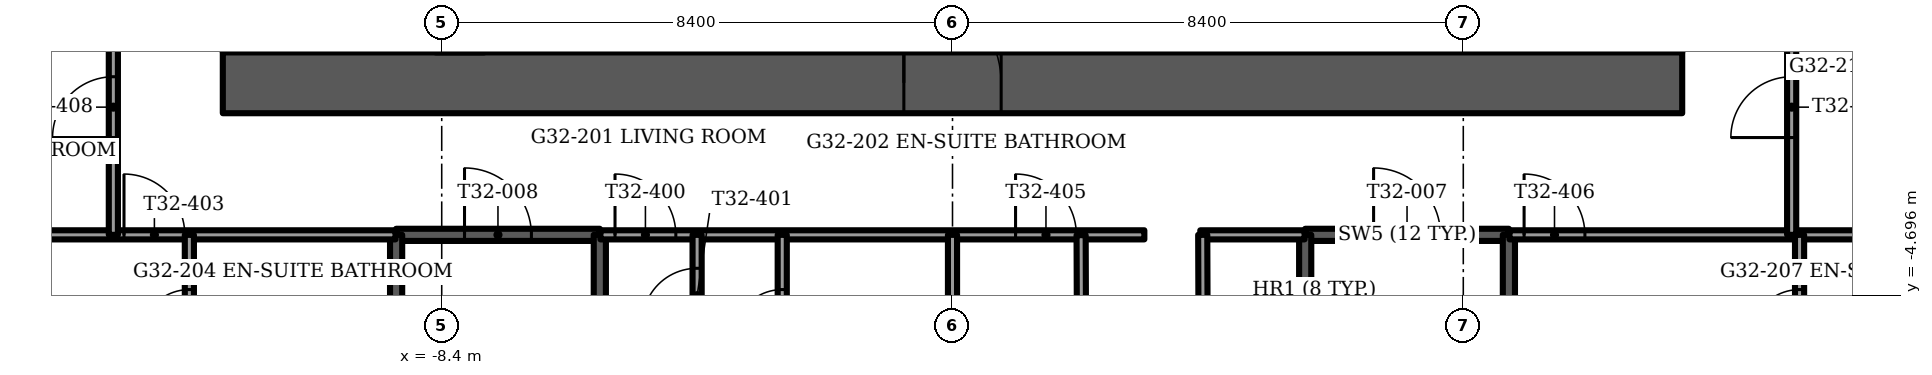
"""IFC4 building model, lengths in metres.
Left out: names, types, materials, properties, quantities, classifications, styles, units other than length and angle.
Written with IfcOpenShell. Run it as: python <this file> out.ifc"""

import sys

from ifc_helpers import new_model, si_unit, direction, frame, frame_2d, origin, place, context, subcontext, project, spatial, rectangle, extrude, element, fill, save


model = new_model("IFC4")
c1 = context("Model", 3, precision=1e-05, world=origin(), true_north=direction((0.0, 1.0)))
c2 = subcontext(c1, "Body", "Model", "MODEL_VIEW")
j1 = project(units=[si_unit("LENGTHUNIT", "METRE"), si_unit("PLANEANGLEUNIT", "RADIAN")], contexts=[c1])
p1 = place(None, origin())
s1 = spatial("IfcSite", under=j1, at=p1, CompositionType="ELEMENT")
p2 = place(p1, origin())
s2 = spatial("IfcBuilding", under=s1, at=p2, CompositionType="ELEMENT")
p3 = place(p2, frame((0.0, 0.0, 131.0)))
s3 = spatial("IfcBuildingStorey", under=s2, at=p3, CompositionType="ELEMENT", Elevation=131.0)
p4 = place(p3, frame((-12.0, -1.2, -0.3), z_axis=(0.0, 0.0, 1.0), x_axis=(1.0, 0.0, 0.0)))
e1 = element("IfcWall", 1, at=p4, inside=s3, PredefinedType="SHEAR", context=c2, shape_type="SweptSolid", body=[
    extrude(rectangle(XDim=24.0, YDim=1.0, at=frame_2d((12.0, 0.0))), origin(), (0.0, 0.0, 1.0), 3.75),
])
p5 = place(p4, frame((11.2, 0.0, 0.0)))
e2 = element("IfcOpeningElement", 2, at=p5, cuts=e1, PredefinedType="OPENING", context=c2, shape_type="SweptSolid", body=[
    extrude(rectangle(XDim=1.6, YDim=2.1, at=frame_2d((0.8, 1.05))), frame((0.0, 0.5, 0.0), z_axis=(0.0, -1.0, 0.0), x_axis=(1.0, 0.0, 0.0)), (0.0, 0.0, 1.0), 1.0),
])
p6 = place(p3, frame((-18.663, -1.525, 0.0), z_axis=(0.0, 0.0, 1.0), x_axis=(0.499997430087, -0.866026887519, 0.0)))
e3 = element("IfcWall", 3, at=p6, inside=s3, PredefinedType="SOLIDWALL", context=c2, shape_type="SweptSolid", body=[
    extrude(rectangle(XDim=10.657, YDim=0.15, at=frame_2d((5.329, 0.0))), origin(), (0.0, 0.0, 1.0), 3.45),
])
p7 = place(p6, frame((2.835, 0.0, 0.15)))
e4 = element("IfcOpeningElement", 4, at=p7, cuts=e3, PredefinedType="OPENING", context=c2, shape_type="SweptSolid", body=[
    extrude(rectangle(XDim=1.7, YDim=2.2, at=frame_2d((0.85, 1.1))), frame((0.0, 0.075, 0.0), z_axis=(0.0, -1.0, 0.0), x_axis=(1.0, 0.0, 0.0)), (0.0, 0.0, 1.0), 0.15),
])
p8 = place(p6, frame((8.573, 0.0, 0.15)))
e5 = element("IfcOpeningElement", 5, at=p8, cuts=e3, PredefinedType="OPENING", context=c2, shape_type="SweptSolid", body=[
    extrude(rectangle(XDim=0.9, YDim=2.2, at=frame_2d((0.45, 1.1))), frame((0.0, 0.075, 0.0), z_axis=(0.0, -1.0, 0.0), x_axis=(1.0, 0.0, 0.0)), (0.0, 0.0, 1.0), 0.15),
])
p9 = place(p6, frame((7.023, 0.0, 0.0)))
e6 = element("IfcOpeningElement", 6, at=p9, cuts=e3, PredefinedType="OPENING", context=c2, shape_type="SweptSolid", body=[
    extrude(rectangle(XDim=1.5, YDim=2.4, at=frame_2d((0.75, 1.2))), frame((0.0, 0.075, 0.0), z_axis=(0.0, -1.0, 0.0), x_axis=(1.0, 0.0, 0.0)), (0.0, 0.0, 1.0), 0.15),
])
p10 = place(p3, frame((13.334, -10.755, 0.0), z_axis=(0.0, 0.0, 1.0), x_axis=(0.499997430087, 0.866026887519, 0.0)))
e7 = element("IfcWall", 7, at=p10, inside=s3, PredefinedType="SOLIDWALL", context=c2, shape_type="SweptSolid", body=[
    extrude(rectangle(XDim=10.657, YDim=0.15, at=frame_2d((5.329, 0.0))), origin(), (0.0, 0.0, 1.0), 3.45),
])
p11 = place(p10, frame((0.847, 0.0, 0.15)))
e8 = element("IfcOpeningElement", 8, at=p11, cuts=e7, PredefinedType="OPENING", context=c2, shape_type="SweptSolid", body=[
    extrude(rectangle(XDim=1.7, YDim=2.2, at=frame_2d((0.85, 1.1))), frame((0.0, 0.075, 0.0), z_axis=(0.0, -1.0, 0.0), x_axis=(1.0, 0.0, 0.0)), (0.0, 0.0, 1.0), 0.15),
])
p12 = place(p10, frame((6.322, 0.0, 0.15)))
e9 = element("IfcOpeningElement", 9, at=p12, cuts=e7, PredefinedType="OPENING", context=c2, shape_type="SweptSolid", body=[
    extrude(rectangle(XDim=1.5, YDim=2.2, at=frame_2d((0.75, 1.1))), frame((0.0, 0.075, 0.0), z_axis=(0.0, -1.0, 0.0), x_axis=(1.0, 0.0, 0.0)), (0.0, 0.0, 1.0), 0.15),
])
for number, where, z_axis, x_axis in (
    (10, (-6.4, -0.7, 0.0), (0.0, 0.0, 1.0), (0.0, 1.0, 0.0)),
    (11, (-5.1, -0.7, 0.0), (0.0, 0.0, 1.0), (0.0, 1.0, 0.0)),
    (12, (5.1, -0.7, 0.0), (0.0, 0.0, 1.0), (0.0, 1.0, 0.0)),
    (13, (6.4, -0.7, 0.0), (0.0, 0.0, 1.0), (0.0, 1.0, 0.0)),
):
    element("IfcWall", number, at=place(p3, frame(where, z_axis=z_axis, x_axis=x_axis)), inside=s3, PredefinedType="PARTITIONING", context=c2, shape_type="SweptSolid", body=[
        extrude(rectangle(XDim=1.6, YDim=0.15, at=frame_2d((0.8, 0.0))), origin(), (0.0, 0.0, 1.0), 3.45),
    ])
p13 = place(p3, frame((5.8, -3.7, -0.3), z_axis=(0.0, 0.0, 1.0), x_axis=(1.0, 0.0, 0.0)))
e14 = element("IfcWall", 14, at=p13, inside=s3, PredefinedType="SOLIDWALL", context=c2, shape_type="SweptSolid", body=[
    extrude(rectangle(XDim=3.35, YDim=0.2, at=frame_2d((1.675, 0.0))), origin(), (0.0, 0.0, 1.0), 3.75),
])
p14 = place(p13, frame((1.125, 0.0, 0.0)))
e15 = element("IfcOpeningElement", 15, at=p14, cuts=e14, PredefinedType="OPENING", context=c2, shape_type="SweptSolid", body=[
    extrude(rectangle(XDim=1.1, YDim=2.1, at=frame_2d((0.55, 1.05))), frame((0.0, 0.1, 0.0), z_axis=(0.0, -1.0, 0.0), x_axis=(1.0, 0.0, 0.0)), (0.0, 0.0, 1.0), 0.2),
])
for number, where, z_axis, x_axis in (
    (16, (5.8, -3.7, -0.3), (0.0, 0.0, 1.0), (0.0, -1.0, 0.0)),
    (17, (9.15, -3.7, -0.3), (0.0, 0.0, 1.0), (0.0, -1.0, 0.0)),
):
    element("IfcWall", number, at=place(p3, frame(where, z_axis=z_axis, x_axis=x_axis)), inside=s3, PredefinedType="SOLIDWALL", context=c2, shape_type="SweptSolid", body=[
        extrude(rectangle(XDim=7.7, YDim=0.2, at=frame_2d((3.85, 0.0))), origin(), (0.0, 0.0, 1.0), 3.75),
    ])
p15 = place(p3, frame((-9.15, -3.7, -0.3), z_axis=(0.0, 0.0, 1.0), x_axis=(1.0, 0.0, 0.0)))
e18 = element("IfcWall", 18, at=p15, inside=s3, PredefinedType="SOLIDWALL", context=c2, shape_type="SweptSolid", body=[
    extrude(rectangle(XDim=3.35, YDim=0.2, at=frame_2d((1.675, 0.0))), origin(), (0.0, 0.0, 1.0), 3.75),
])
p16 = place(p15, frame((1.125, 0.0, 0.0)))
e19 = element("IfcOpeningElement", 19, at=p16, cuts=e18, PredefinedType="OPENING", context=c2, shape_type="SweptSolid", body=[
    extrude(rectangle(XDim=1.1, YDim=2.1, at=frame_2d((0.55, 1.05))), frame((0.0, 0.1, 0.0), z_axis=(0.0, -1.0, 0.0), x_axis=(1.0, 0.0, 0.0)), (0.0, 0.0, 1.0), 0.2),
])
for number, where, z_axis, x_axis in (
    (20, (-9.15, -3.7, -0.3), (0.0, 0.0, 1.0), (0.0, -1.0, 0.0)),
    (21, (-5.8, -3.7, -0.3), (0.0, 0.0, 1.0), (0.0, -1.0, 0.0)),
):
    element("IfcWall", number, at=place(p3, frame(where, z_axis=z_axis, x_axis=x_axis)), inside=s3, PredefinedType="SOLIDWALL", context=c2, shape_type="SweptSolid", body=[
        extrude(rectangle(XDim=7.7, YDim=0.2, at=frame_2d((3.85, 0.0))), origin(), (0.0, 0.0, 1.0), 3.75),
    ])
p17 = place(p3, frame((-17.459, -3.7, 0.0), z_axis=(0.0, 0.0, 1.0), x_axis=(1.0, 0.0, 0.0)))
e22 = element("IfcWall", 22, at=p17, inside=s3, PredefinedType="PARTITIONING", context=c2, shape_type="SweptSolid", body=[
    extrude(rectangle(XDim=8.299, YDim=0.15, at=frame_2d((4.149, 0.0))), origin(), (0.0, 0.0, 1.0), 3.45),
])
p18 = place(p17, frame((3.834, 0.0, 0.0)))
e23 = element("IfcOpeningElement", 23, at=p18, cuts=e22, PredefinedType="OPENING", context=c2, shape_type="SweptSolid", body=[
    extrude(rectangle(XDim=1.0, YDim=2.1, at=frame_2d((0.5, 1.05))), frame((0.0, 0.075, 0.0), z_axis=(0.0, -1.0, 0.0), x_axis=(1.0, 0.0, 0.0)), (0.0, 0.0, 1.0), 0.15),
])
p19 = place(p3, frame((-5.79, -3.7, 0.0), z_axis=(0.0, 0.0, 1.0), x_axis=(1.0, 0.0, 0.0)))
e24 = element("IfcWall", 24, at=p19, inside=s3, PredefinedType="PARTITIONING", context=c2, shape_type="SweptSolid", body=[
    extrude(rectangle(XDim=8.945, YDim=0.15, at=frame_2d((4.473, 0.0))), origin(), (0.0, 0.0, 1.0), 3.45),
])
p20 = place(p19, frame((0.24, 0.0, 0.0)))
e25 = element("IfcOpeningElement", 25, at=p20, cuts=e24, PredefinedType="OPENING", context=c2, shape_type="SweptSolid", body=[
    extrude(rectangle(XDim=1.0, YDim=2.1, at=frame_2d((0.5, 1.05))), frame((0.0, 0.075, 0.0), z_axis=(0.0, -1.0, 0.0), x_axis=(1.0, 0.0, 0.0)), (0.0, 0.0, 1.0), 0.15),
])
p21 = place(p19, frame((6.827, 0.0, 0.0)))
e26 = element("IfcOpeningElement", 26, at=p21, cuts=e24, PredefinedType="OPENING", context=c2, shape_type="SweptSolid", body=[
    extrude(rectangle(XDim=1.0, YDim=2.1, at=frame_2d((0.5, 1.05))), frame((0.0, 0.075, 0.0), z_axis=(0.0, -1.0, 0.0), x_axis=(1.0, 0.0, 0.0)), (0.0, 0.0, 1.0), 0.15),
])
p22 = place(p3, frame((4.075, -3.7, 0.0), z_axis=(0.0, 0.0, 1.0), x_axis=(1.0, 0.0, 0.0)))
e27 = element("IfcWall", 27, at=p22, inside=s3, PredefinedType="PARTITIONING", context=c2, shape_type="SweptSolid", body=[
    extrude(rectangle(XDim=1.715, YDim=0.15, at=frame_2d((0.857, 0.0))), origin(), (0.0, 0.0, 1.0), 3.45),
])
p23 = place(p3, frame((9.16, -3.7, 0.0), z_axis=(0.0, 0.0, 1.0), x_axis=(1.0, 0.0, 0.0)))
e28 = element("IfcWall", 28, at=p23, inside=s3, PredefinedType="PARTITIONING", context=c2, shape_type="SweptSolid", body=[
    extrude(rectangle(XDim=8.299, YDim=0.15, at=frame_2d((4.149, 0.0))), origin(), (0.0, 0.0, 1.0), 3.45),
])
p24 = place(p23, frame((0.24, 0.0, 0.0)))
e29 = element("IfcOpeningElement", 29, at=p24, cuts=e28, PredefinedType="OPENING", context=c2, shape_type="SweptSolid", body=[
    extrude(rectangle(XDim=1.0, YDim=2.1, at=frame_2d((0.5, 1.05))), frame((0.0, 0.075, 0.0), z_axis=(0.0, -1.0, 0.0), x_axis=(1.0, 0.0, 0.0)), (0.0, 0.0, 1.0), 0.15),
])
p25 = place(p3, frame((13.93, -6.3, 0.0), z_axis=(0.0, 0.0, 1.0), x_axis=(0.0, 1.0, 0.0)))
e30 = element("IfcWall", 30, at=p25, inside=s3, PredefinedType="PARTITIONING", context=c2, shape_type="SweptSolid", body=[
    extrude(rectangle(XDim=2.6, YDim=0.15, at=frame_2d((1.3, 0.0))), origin(), (0.0, 0.0, 1.0), 3.45),
])
p26 = place(p25, frame((0.9, 0.0, 0.0)))
e31 = element("IfcOpeningElement", 31, at=p26, cuts=e30, PredefinedType="OPENING", context=c2, shape_type="SweptSolid", body=[
    extrude(rectangle(XDim=0.8, YDim=2.1, at=frame_2d((0.4, 1.05))), frame((0.0, 0.075, 0.0), z_axis=(0.0, -1.0, 0.0), x_axis=(1.0, 0.0, 0.0)), (0.0, 0.0, 1.0), 0.15),
])
p27 = place(p3, frame((13.8, -3.7, 0.0), z_axis=(0.0, 0.0, 1.0), x_axis=(0.0, 1.0, 0.0)))
e32 = element("IfcWall", 32, at=p27, inside=s3, PredefinedType="PARTITIONING", context=c2, shape_type="SweptSolid", body=[
    extrude(rectangle(XDim=11.752, YDim=0.15, at=frame_2d((5.876, 0.0))), origin(), (0.0, 0.0, 1.0), 3.45),
])
p28 = place(p27, frame((1.6, 0.0, 0.0)))
e33 = element("IfcOpeningElement", 33, at=p28, cuts=e32, PredefinedType="OPENING", context=c2, shape_type="SweptSolid", body=[
    extrude(rectangle(XDim=1.0, YDim=2.1, at=frame_2d((0.5, 1.05))), frame((0.0, 0.075, 0.0), z_axis=(0.0, -1.0, 0.0), x_axis=(1.0, 0.0, 0.0)), (0.0, 0.0, 1.0), 0.15),
])
p29 = place(p27, frame((7.353, 0.0, 0.0)))
e34 = element("IfcOpeningElement", 34, at=p29, cuts=e32, PredefinedType="OPENING", context=c2, shape_type="SweptSolid", body=[
    extrude(rectangle(XDim=1.0, YDim=2.1, at=frame_2d((0.5, 1.05))), frame((0.0, 0.075, 0.0), z_axis=(0.0, -1.0, 0.0), x_axis=(1.0, 0.0, 0.0)), (0.0, 0.0, 1.0), 0.15),
])
p30 = place(p3, frame((0.0, -9.01, 0.0), z_axis=(0.0, 0.0, 1.0), x_axis=(0.0, 1.0, 0.0)))
e35 = element("IfcWall", 35, at=p30, inside=s3, PredefinedType="PARTITIONING", context=c2, shape_type="SweptSolid", body=[
    extrude(rectangle(XDim=5.31, YDim=0.15, at=frame_2d((2.655, 0.0))), origin(), (0.0, 0.0, 1.0), 3.45),
])
p31 = place(p3, frame((-2.8, -6.3, 0.0), z_axis=(0.0, 0.0, 1.0), x_axis=(0.0, 1.0, 0.0)))
e36 = element("IfcWall", 36, at=p31, inside=s3, PredefinedType="PARTITIONING", context=c2, shape_type="SweptSolid", body=[
    extrude(rectangle(XDim=2.6, YDim=0.15, at=frame_2d((1.3, 0.0))), origin(), (0.0, 0.0, 1.0), 3.45),
])
p32 = place(p31, frame((0.9, 0.0, 0.0)))
e37 = element("IfcOpeningElement", 37, at=p32, cuts=e36, PredefinedType="OPENING", context=c2, shape_type="SweptSolid", body=[
    extrude(rectangle(XDim=0.8, YDim=2.1, at=frame_2d((0.4, 1.05))), frame((0.0, 0.075, 0.0), z_axis=(0.0, -1.0, 0.0), x_axis=(1.0, 0.0, 0.0)), (0.0, 0.0, 1.0), 0.15),
])
p33 = place(p3, frame((-4.2, -9.01, 0.0), z_axis=(0.0, 0.0, 1.0), x_axis=(0.0, 1.0, 0.0)))
e38 = element("IfcWall", 38, at=p33, inside=s3, PredefinedType="PARTITIONING", context=c2, shape_type="SweptSolid", body=[
    extrude(rectangle(XDim=5.31, YDim=0.15, at=frame_2d((2.655, 0.0))), origin(), (0.0, 0.0, 1.0), 3.45),
])
p34 = place(p33, frame((3.86, 0.0, 0.0)))
e39 = element("IfcOpeningElement", 39, at=p34, cuts=e38, PredefinedType="OPENING", context=c2, shape_type="SweptSolid", body=[
    extrude(rectangle(XDim=0.9, YDim=2.1, at=frame_2d((0.45, 1.05))), frame((0.0, 0.075, 0.0), z_axis=(0.0, -1.0, 0.0), x_axis=(1.0, 0.0, 0.0)), (0.0, 0.0, 1.0), 0.15),
])
p35 = place(p3, frame((-12.55, -6.3, 0.0), z_axis=(0.0, 0.0, 1.0), x_axis=(0.0, 1.0, 0.0)))
e40 = element("IfcWall", 40, at=p35, inside=s3, PredefinedType="PARTITIONING", context=c2, shape_type="SweptSolid", body=[
    extrude(rectangle(XDim=2.6, YDim=0.15, at=frame_2d((1.3, 0.0))), origin(), (0.0, 0.0, 1.0), 3.45),
])
p36 = place(p35, frame((0.9, 0.0, 0.0)))
e41 = element("IfcOpeningElement", 41, at=p36, cuts=e40, PredefinedType="OPENING", context=c2, shape_type="SweptSolid", body=[
    extrude(rectangle(XDim=0.8, YDim=2.1, at=frame_2d((0.4, 1.05))), frame((0.0, 0.075, 0.0), z_axis=(0.0, -1.0, 0.0), x_axis=(1.0, 0.0, 0.0)), (0.0, 0.0, 1.0), 0.15),
])
p37 = place(p3, frame((-13.8, -3.7, 0.0), z_axis=(0.0, 0.0, 1.0), x_axis=(0.0, 1.0, 0.0)))
e42 = element("IfcWall", 42, at=p37, inside=s3, PredefinedType="PARTITIONING", context=c2, shape_type="SweptSolid", body=[
    extrude(rectangle(XDim=11.752, YDim=0.15, at=frame_2d((5.876, 0.0))), origin(), (0.0, 0.0, 1.0), 3.45),
])
p38 = place(p37, frame((1.6, 0.0, 0.0)))
e43 = element("IfcOpeningElement", 43, at=p38, cuts=e42, PredefinedType="OPENING", context=c2, shape_type="SweptSolid", body=[
    extrude(rectangle(XDim=1.0, YDim=2.1, at=frame_2d((0.5, 1.05))), frame((0.0, 0.075, 0.0), z_axis=(0.0, -1.0, 0.0), x_axis=(1.0, 0.0, 0.0)), (0.0, 0.0, 1.0), 0.15),
])
p39 = place(p37, frame((7.353, 0.0, 0.0)))
e44 = element("IfcOpeningElement", 44, at=p39, cuts=e42, PredefinedType="OPENING", context=c2, shape_type="SweptSolid", body=[
    extrude(rectangle(XDim=1.0, YDim=2.1, at=frame_2d((0.5, 1.05))), frame((0.0, 0.075, 0.0), z_axis=(0.0, -1.0, 0.0), x_axis=(1.0, 0.0, 0.0)), (0.0, 0.0, 1.0), 0.15),
])
p40 = place(p3, frame((4.134, -8.87, 0.0), z_axis=(0.0, 0.0, 1.0), x_axis=(-0.003683216269, 0.999993216936, 0.0)))
e45 = element("IfcWall", 45, at=p40, inside=s3, PredefinedType="PARTITIONING", context=c2, shape_type="SweptSolid", body=[
    extrude(rectangle(XDim=5.17, YDim=0.15, at=frame_2d((2.585, 0.0))), origin(), (0.0, 0.0, 1.0), 3.45),
])
p41 = place(p3, frame((2.134, -8.87, 0.0), z_axis=(0.0, 0.0, 1.0), x_axis=(-0.003686872276, 0.999993203463, 0.0)))
e46 = element("IfcWall", 46, at=p41, inside=s3, PredefinedType="PARTITIONING", context=c2, shape_type="SweptSolid", body=[
    extrude(rectangle(XDim=5.165, YDim=0.15, at=frame_2d((2.583, 0.0))), origin(), (0.0, 0.0, 1.0), 3.45),
])
p42 = place(p5, origin())
e47 = element("IfcDoor", 47, at=p42, inside=s3, OperationType="DOUBLE_DOOR_SINGLE_SWING", PredefinedType="DOOR", context=c2, shape_type="SweptSolid", body=[
    extrude(rectangle(XDim=1.6, YDim=2.1, at=frame_2d((0.8, 1.05))), frame((0.0, 0.025, 0.0), z_axis=(0.0, -1.0, 0.0), x_axis=(1.0, 0.0, 0.0)), (0.0, 0.0, 1.0), 0.05),
])
fill(e2, e47)
p43 = place(p14, origin())
e48 = element("IfcDoor", 48, at=p43, inside=s3, OperationType="SINGLE_SWING_LEFT", PredefinedType="DOOR", context=c2, shape_type="SweptSolid", body=[
    extrude(rectangle(XDim=1.1, YDim=2.1, at=frame_2d((0.55, 1.05))), frame((0.0, 0.025, 0.0), z_axis=(0.0, -1.0, 0.0), x_axis=(1.0, 0.0, 0.0)), (0.0, 0.0, 1.0), 0.05),
])
fill(e15, e48)
p44 = place(p16, origin())
e49 = element("IfcDoor", 49, at=p44, inside=s3, OperationType="SINGLE_SWING_LEFT", PredefinedType="DOOR", context=c2, shape_type="SweptSolid", body=[
    extrude(rectangle(XDim=1.1, YDim=2.1, at=frame_2d((0.55, 1.05))), frame((0.0, 0.025, 0.0), z_axis=(0.0, -1.0, 0.0), x_axis=(1.0, 0.0, 0.0)), (0.0, 0.0, 1.0), 0.05),
])
fill(e19, e49)
p45 = place(p20, origin())
e50 = element("IfcDoor", 50, at=p45, inside=s3, OperationType="SINGLE_SWING_LEFT", PredefinedType="DOOR", context=c2, shape_type="SweptSolid", body=[
    extrude(rectangle(XDim=1.0, YDim=2.1, at=frame_2d((0.5, 1.05))), frame((0.0, 0.025, 0.0), z_axis=(0.0, -1.0, 0.0), x_axis=(1.0, 0.0, 0.0)), (0.0, 0.0, 1.0), 0.05),
])
fill(e25, e50)
p46 = place(p34, origin())
e51 = element("IfcDoor", 51, at=p46, inside=s3, OperationType="SINGLE_SWING_RIGHT", PredefinedType="DOOR", context=c2, shape_type="SweptSolid", body=[
    extrude(rectangle(XDim=0.9, YDim=2.1, at=frame_2d((0.45, 1.05))), frame((0.0, 0.025, 0.0), z_axis=(0.0, -1.0, 0.0), x_axis=(1.0, 0.0, 0.0)), (0.0, 0.0, 1.0), 0.05),
])
fill(e39, e51)
p47 = place(p32, origin())
e52 = element("IfcDoor", 52, at=p47, inside=s3, OperationType="SINGLE_SWING_RIGHT", PredefinedType="DOOR", context=c2, shape_type="SweptSolid", body=[
    extrude(rectangle(XDim=0.8, YDim=2.1, at=frame_2d((0.4, 1.05))), frame((0.0, 0.025, 0.0), z_axis=(0.0, -1.0, 0.0), x_axis=(1.0, 0.0, 0.0)), (0.0, 0.0, 1.0), 0.05),
])
fill(e37, e52)
p48 = place(p18, origin())
e53 = element("IfcDoor", 53, at=p48, inside=s3, OperationType="SINGLE_SWING_LEFT", PredefinedType="DOOR", context=c2, shape_type="SweptSolid", body=[
    extrude(rectangle(XDim=1.0, YDim=2.1, at=frame_2d((0.5, 1.05))), frame((0.0, 0.025, 0.0), z_axis=(0.0, -1.0, 0.0), x_axis=(1.0, 0.0, 0.0)), (0.0, 0.0, 1.0), 0.05),
])
fill(e23, e53)
p49 = place(p36, origin())
e54 = element("IfcDoor", 54, at=p49, inside=s3, OperationType="SINGLE_SWING_RIGHT", PredefinedType="DOOR", context=c2, shape_type="SweptSolid", body=[
    extrude(rectangle(XDim=0.8, YDim=2.1, at=frame_2d((0.4, 1.05))), frame((0.0, 0.025, 0.0), z_axis=(0.0, -1.0, 0.0), x_axis=(1.0, 0.0, 0.0)), (0.0, 0.0, 1.0), 0.05),
])
fill(e41, e54)
p50 = place(p21, origin())
e55 = element("IfcDoor", 55, at=p50, inside=s3, OperationType="SINGLE_SWING_LEFT", PredefinedType="DOOR", context=c2, shape_type="SweptSolid", body=[
    extrude(rectangle(XDim=1.0, YDim=2.1, at=frame_2d((0.5, 1.05))), frame((0.0, 0.025, 0.0), z_axis=(0.0, -1.0, 0.0), x_axis=(1.0, 0.0, 0.0)), (0.0, 0.0, 1.0), 0.05),
])
fill(e26, e55)
p51 = place(p24, origin())
e56 = element("IfcDoor", 56, at=p51, inside=s3, OperationType="SINGLE_SWING_LEFT", PredefinedType="DOOR", context=c2, shape_type="SweptSolid", body=[
    extrude(rectangle(XDim=1.0, YDim=2.1, at=frame_2d((0.5, 1.05))), frame((0.0, 0.025, 0.0), z_axis=(0.0, -1.0, 0.0), x_axis=(1.0, 0.0, 0.0)), (0.0, 0.0, 1.0), 0.05),
])
fill(e29, e56)
p52 = place(p26, origin())
e57 = element("IfcDoor", 57, at=p52, inside=s3, OperationType="SINGLE_SWING_RIGHT", PredefinedType="DOOR", context=c2, shape_type="SweptSolid", body=[
    extrude(rectangle(XDim=0.8, YDim=2.1, at=frame_2d((0.4, 1.05))), frame((0.0, 0.025, 0.0), z_axis=(0.0, -1.0, 0.0), x_axis=(1.0, 0.0, 0.0)), (0.0, 0.0, 1.0), 0.05),
])
fill(e31, e57)
p53 = place(p38, origin())
e58 = element("IfcDoor", 58, at=p53, inside=s3, OperationType="SINGLE_SWING_RIGHT", PredefinedType="DOOR", context=c2, shape_type="SweptSolid", body=[
    extrude(rectangle(XDim=1.0, YDim=2.1, at=frame_2d((0.5, 1.05))), frame((0.0, 0.025, 0.0), z_axis=(0.0, -1.0, 0.0), x_axis=(1.0, 0.0, 0.0)), (0.0, 0.0, 1.0), 0.05),
])
fill(e43, e58)
p54 = place(p28, origin())
e59 = element("IfcDoor", 59, at=p54, inside=s3, OperationType="SINGLE_SWING_LEFT", PredefinedType="DOOR", context=c2, shape_type="SweptSolid", body=[
    extrude(rectangle(XDim=1.0, YDim=2.1, at=frame_2d((0.5, 1.05))), frame((0.0, 0.025, 0.0), z_axis=(0.0, -1.0, 0.0), x_axis=(1.0, 0.0, 0.0)), (0.0, 0.0, 1.0), 0.05),
])
fill(e33, e59)
save(model, sys.argv[1])
